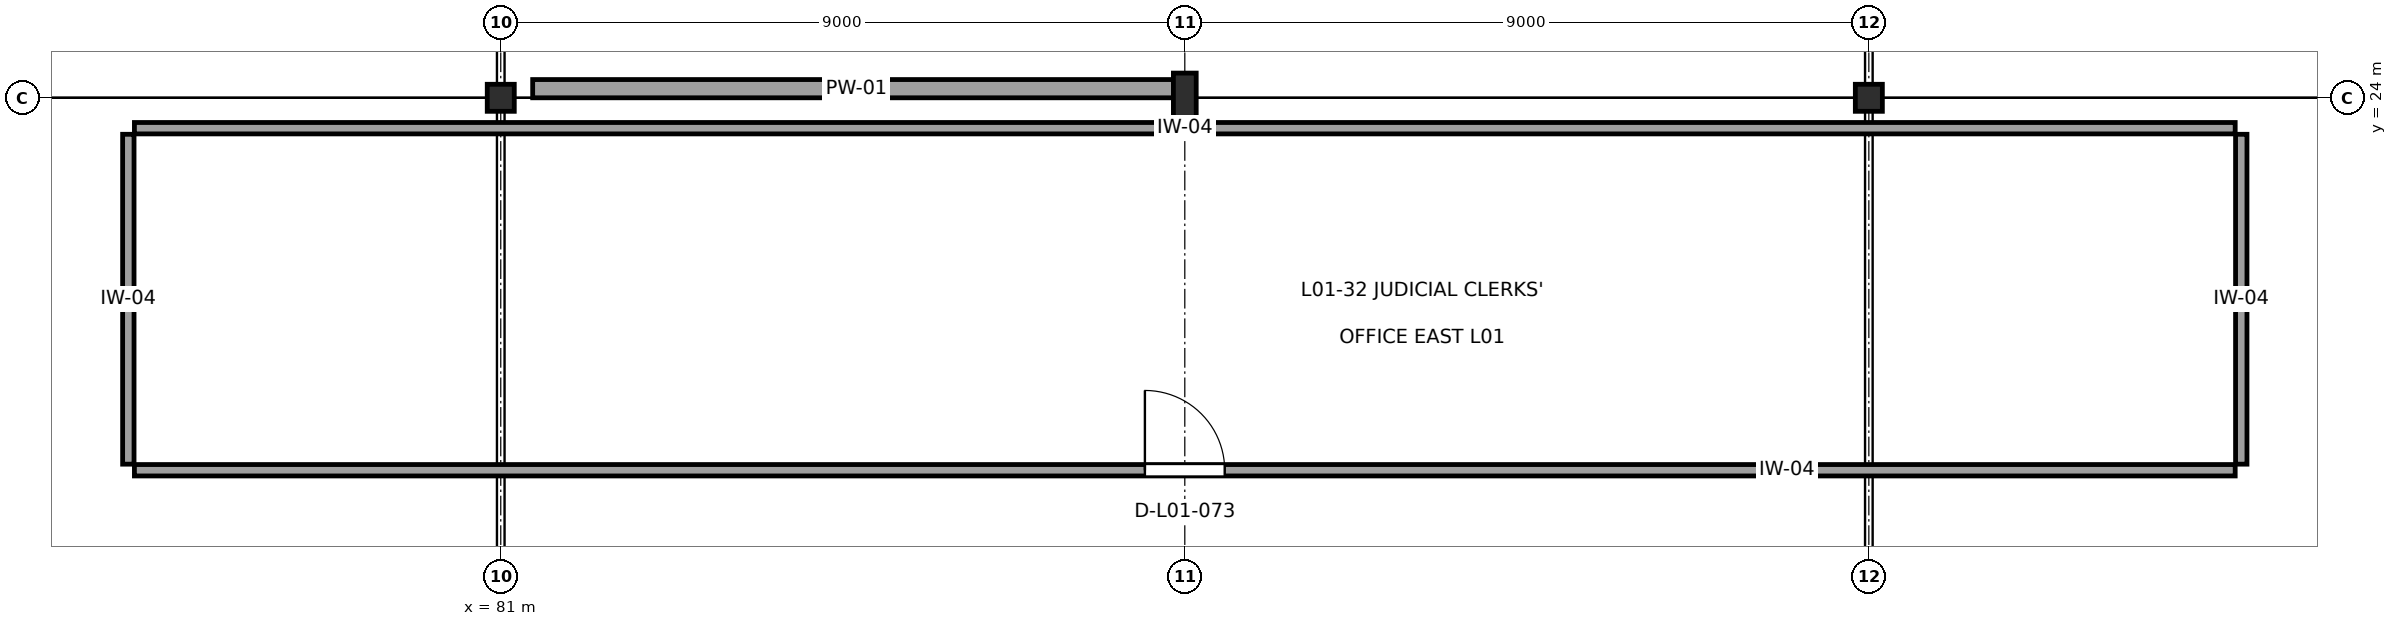
"""IFC4 building model, lengths in metres.
Left out: names, types, materials, properties, quantities, classifications, styles, units other than length and angle.
Written with IfcOpenShell. Run it as: python <this file> out.ifc"""

import sys

from ifc_helpers import new_model, si_unit, direction, frame, frame_2d, origin, origin_2d, place, context, subcontext, project, spatial, rectangle, hollow_circle, i_section, extrude, element, fill, save


model = new_model("IFC4")
c1 = context("Model", 3, precision=1e-05, world=origin(), true_north=direction((0.0, 1.0)))
c2 = subcontext(c1, "Body", "Model", "MODEL_VIEW")
j1 = project(units=[si_unit("LENGTHUNIT", "METRE"), si_unit("PLANEANGLEUNIT", "RADIAN")], contexts=[c1])
p1 = place(None, origin())
s1 = spatial("IfcSite", under=j1, at=p1, CompositionType="ELEMENT")
p2 = place(p1, origin())
s2 = spatial("IfcBuilding", under=s1, at=p2, CompositionType="ELEMENT")
p3 = place(p2, frame((0.0, 0.0, 5.4)))
s3 = spatial("IfcBuildingStorey", under=s2, at=p3, CompositionType="ELEMENT", Elevation=5.4)
p4 = place(p3, frame((81.0, 24.0, 0.0), z_axis=(0.0, 0.0, 1.0), x_axis=(1.0, 0.0, 0.0)))
e1 = element("IfcColumn", 1, at=p4, inside=s3, PredefinedType="PILASTER", context=c2, shape_type="SweptSolid", body=[
    extrude(hollow_circle(Radius=0.178, WallThickness=0.016, at=origin_2d()), origin(), (0.0, 0.0, 1.0), 4.5),
])
p5 = place(p3, frame((90.0, 24.0, 0.0), z_axis=(0.0, 0.0, 1.0), x_axis=(1.0, 0.0, 0.0)))
e2 = element("IfcColumn", 2, at=p5, inside=s3, PredefinedType="COLUMN", context=c2, shape_type="SweptSolid", body=[
    extrude(i_section(OverallWidth=0.3, OverallDepth=0.65, WebThickness=0.016, FlangeThickness=0.031, at=origin_2d()), origin(), (0.0, 0.0, 1.0), 4.5),
])
p6 = place(p3, frame((99.0, 24.0, 0.0), z_axis=(0.0, 0.0, 1.0), x_axis=(1.0, 0.0, 0.0)))
e3 = element("IfcColumn", 3, at=p6, inside=s3, PredefinedType="PILASTER", context=c2, shape_type="SweptSolid", body=[
    extrude(hollow_circle(Radius=0.178, WallThickness=0.016, at=origin_2d()), origin(), (0.0, 0.0, 1.0), 4.5),
])
p7 = place(p3, frame((81.42, 24.12, -0.1), z_axis=(0.0, 0.0, 1.0), x_axis=(1.0, 0.0, 0.0)))
e4 = element("IfcWall", 4, at=p7, inside=s3, PredefinedType="PARAPET", context=c2, shape_type="SweptSolid", body=[
    extrude(rectangle(XDim=8.52, YDim=0.24, at=frame_2d((4.26, 0.0))), origin(), (0.0, 0.0, 1.0), 0.85),
])
p8 = place(p3, frame((103.82, 19.1, 0.0), z_axis=(0.0, 0.0, 1.0), x_axis=(-1.0, 0.0, 0.0)))
e5 = element("IfcWall", 5, at=p8, inside=s3, PredefinedType="PARTITIONING", context=c2, shape_type="SweptSolid", body=[
    extrude(rectangle(XDim=27.64, YDim=0.15, at=frame_2d((13.82, 0.0))), origin(), (0.0, 0.0, 1.0), 4.14),
])
p9 = place(p8, frame((13.295, 0.0, 0.0)))
e6 = element("IfcOpeningElement", 6, at=p9, cuts=e5, PredefinedType="OPENING", context=c2, shape_type="SweptSolid", body=[
    extrude(rectangle(XDim=1.05, YDim=2.25, at=frame_2d((0.525, 1.125))), frame((0.0, 0.09, 0.0), z_axis=(0.0, -1.0, 0.0), x_axis=(1.0, 0.0, 0.0)), (0.0, 0.0, 1.0), 0.18),
])
p10 = place(p3, frame((76.1, 19.18, 0.0), z_axis=(0.0, 0.0, 1.0), x_axis=(0.0, 1.0, 0.0)))
e7 = element("IfcWall", 7, at=p10, inside=s3, PredefinedType="PARTITIONING", context=c2, shape_type="SweptSolid", body=[
    extrude(rectangle(XDim=4.34, YDim=0.15, at=frame_2d((2.17, 0.0))), origin(), (0.0, 0.0, 1.0), 4.14),
])
p11 = place(p3, frame((76.18, 23.6, 0.0), z_axis=(0.0, 0.0, 1.0), x_axis=(1.0, 0.0, 0.0)))
e8 = element("IfcWall", 8, at=p11, inside=s3, PredefinedType="PARTITIONING", context=c2, shape_type="SweptSolid", body=[
    extrude(rectangle(XDim=27.64, YDim=0.15, at=frame_2d((13.82, 0.0))), origin(), (0.0, 0.0, 1.0), 4.14),
])
p12 = place(p3, frame((103.9, 23.52, 0.0), z_axis=(0.0, 0.0, 1.0), x_axis=(0.0, -1.0, 0.0)))
e9 = element("IfcWall", 9, at=p12, inside=s3, PredefinedType="PARTITIONING", context=c2, shape_type="SweptSolid", body=[
    extrude(rectangle(XDim=4.34, YDim=0.15, at=frame_2d((2.17, 0.0))), origin(), (0.0, 0.0, 1.0), 4.14),
])
p13 = place(p9, frame((1.05, 0.0, 0.0), z_axis=(0.0, 0.0, 1.0), x_axis=(-1.0, 0.0, 0.0)))
e10 = element("IfcDoor", 10, at=p13, inside=s3, OperationType="SINGLE_SWING_RIGHT", PredefinedType="DOOR", context=c2, shape_type="SweptSolid", body=[
    extrude(rectangle(XDim=1.05, YDim=2.25, at=frame_2d((0.525, 1.125))), frame((0.0, 0.025, 0.0), z_axis=(0.0, -1.0, 0.0), x_axis=(1.0, 0.0, 0.0)), (0.0, 0.0, 1.0), 0.05),
])
fill(e6, e10)
save(model, sys.argv[1])
